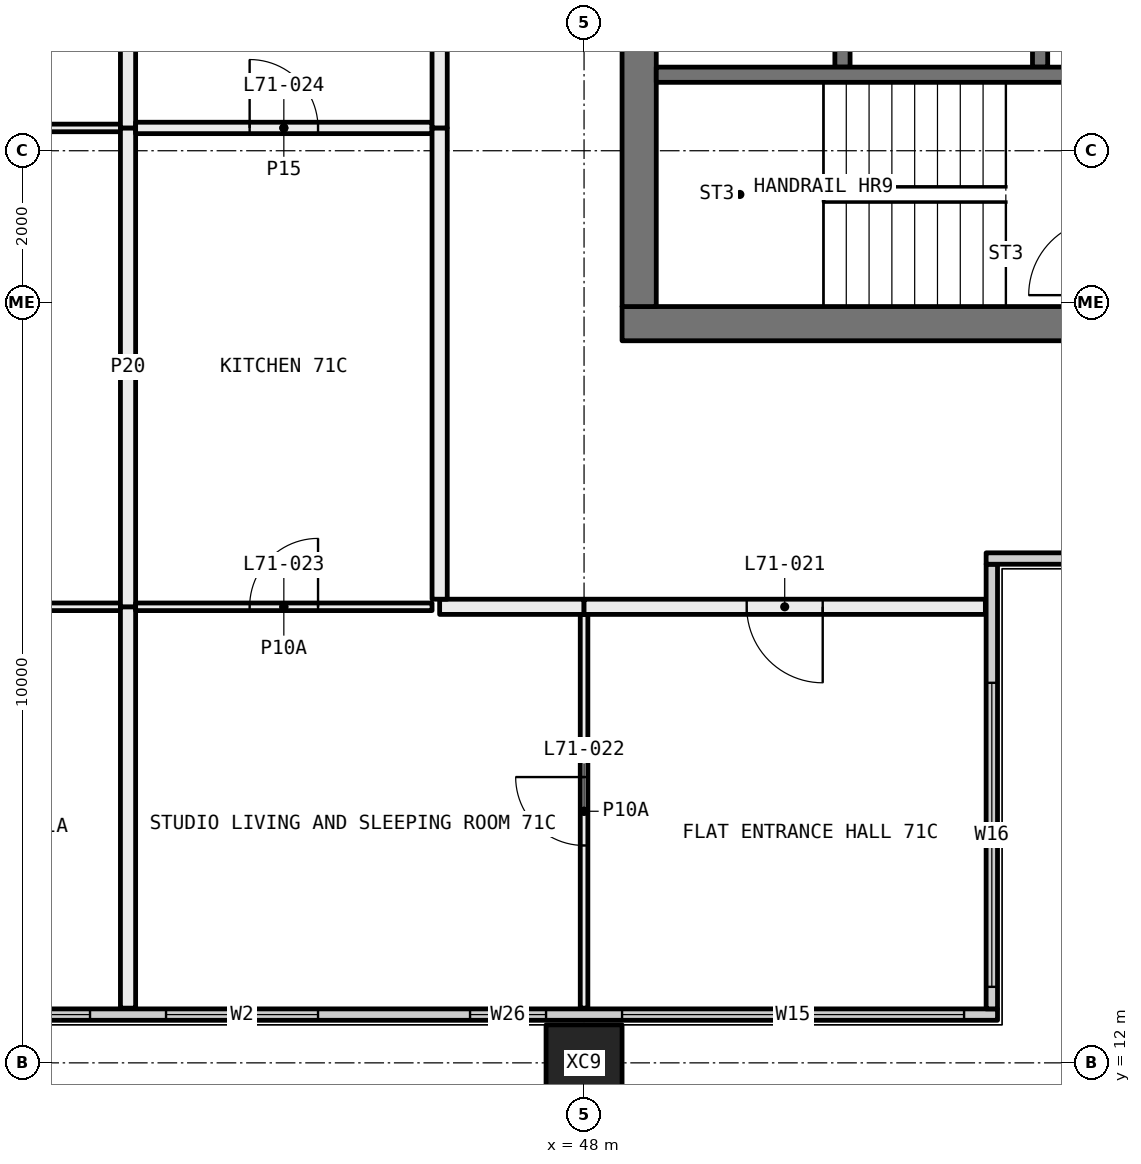
"""IFC4 building model, lengths in metres.
Left out: names, types, materials, properties, quantities, classifications, styles, units other than length and angle.
Written with IfcOpenShell. Run it as: python <this file> out.ifc"""

import sys

from ifc_helpers import new_model, si_unit, direction, frame, frame_2d, origin, origin_2d, place, context, subcontext, project, spatial, rectangle, hollow_rectangle, extrude, element, fill, save


model = new_model("IFC4")
c1 = context("Model", 3, precision=1e-05, world=origin(), true_north=direction((0.0, 1.0)))
c2 = subcontext(c1, "Body", "Model", "MODEL_VIEW")
j1 = project(units=[si_unit("LENGTHUNIT", "METRE"), si_unit("PLANEANGLEUNIT", "RADIAN")], contexts=[c1])
p1 = place(None, origin())
s1 = spatial("IfcSite", under=j1, at=p1, CompositionType="ELEMENT")
p2 = place(p1, origin())
s2 = spatial("IfcBuilding", under=s1, at=p2, CompositionType="ELEMENT")
p3 = place(p2, frame((0.0, 0.0, 262.8)))
s3 = spatial("IfcBuildingStorey", under=s2, at=p3, CompositionType="ELEMENT", Elevation=262.8)
p4 = place(p3, frame((48.0, 12.0, -0.4), z_axis=(0.0, 0.0, 1.0), x_axis=(1.0, 0.0, 0.0)))
e1 = element("IfcColumn", 1, at=p4, inside=s3, PredefinedType="COLUMN", context=c2, shape_type="SweptSolid", body=[
    extrude(hollow_rectangle(XDim=1.0, YDim=1.0, WallThickness=0.036, at=origin_2d()), origin(), (0.0, 0.0, 1.0), 3.45),
])
p5 = place(p3, frame((18.56, 12.635, 0.0), z_axis=(0.0, 0.0, 1.0), x_axis=(1.0, 0.0, 0.0)))
e2 = element("IfcWall", 2, at=p5, inside=s3, PredefinedType="ELEMENTEDWALL", context=c2, shape_type="SweptSolid", body=[
    extrude(rectangle(XDim=34.88, YDim=0.15, at=frame_2d((17.44, 0.0))), origin(), (0.0, 0.0, 1.0), 3.05),
])
p6 = place(p5, frame((0.44, 0.0, 0.45)))
e3 = element("IfcOpeningElement", 3, at=p6, cuts=e2, PredefinedType="OPENING", context=c2, shape_type="SweptSolid", body=[
    extrude(rectangle(XDim=4.5, YDim=2.55, at=frame_2d((2.25, 1.275))), frame((0.0, 0.085, 0.0), z_axis=(0.0, -1.0, 0.0), x_axis=(1.0, 0.0, 0.0)), (0.0, 0.0, 1.0), 0.17),
])
p7 = place(p5, frame((5.94, 0.0, 0.45)))
e4 = element("IfcOpeningElement", 4, at=p7, cuts=e2, PredefinedType="OPENING", context=c2, shape_type="SweptSolid", body=[
    extrude(rectangle(XDim=1.0, YDim=2.55, at=frame_2d((0.5, 1.275))), frame((0.0, 0.085, 0.0), z_axis=(0.0, -1.0, 0.0), x_axis=(1.0, 0.0, 0.0)), (0.0, 0.0, 1.0), 0.17),
])
p8 = place(p5, frame((8.94, 0.0, 0.45)))
e5 = element("IfcOpeningElement", 5, at=p8, cuts=e2, PredefinedType="OPENING", context=c2, shape_type="SweptSolid", body=[
    extrude(rectangle(XDim=2.0, YDim=2.55, at=frame_2d((1.0, 1.275))), frame((0.0, 0.085, 0.0), z_axis=(0.0, -1.0, 0.0), x_axis=(1.0, 0.0, 0.0)), (0.0, 0.0, 1.0), 0.17),
])
p9 = place(p5, frame((11.94, 0.0, 0.45)))
e6 = element("IfcOpeningElement", 6, at=p9, cuts=e2, PredefinedType="OPENING", context=c2, shape_type="SweptSolid", body=[
    extrude(rectangle(XDim=2.0, YDim=2.55, at=frame_2d((1.0, 1.275))), frame((0.0, 0.085, 0.0), z_axis=(0.0, -1.0, 0.0), x_axis=(1.0, 0.0, 0.0)), (0.0, 0.0, 1.0), 0.17),
])
p10 = place(p5, frame((15.94, 0.0, 0.45)))
e7 = element("IfcOpeningElement", 7, at=p10, cuts=e2, PredefinedType="OPENING", context=c2, shape_type="SweptSolid", body=[
    extrude(rectangle(XDim=1.0, YDim=2.55, at=frame_2d((0.5, 1.275))), frame((0.0, 0.085, 0.0), z_axis=(0.0, -1.0, 0.0), x_axis=(1.0, 0.0, 0.0)), (0.0, 0.0, 1.0), 0.17),
])
p11 = place(p5, frame((17.94, 0.0, 0.45)))
e8 = element("IfcOpeningElement", 8, at=p11, cuts=e2, PredefinedType="OPENING", context=c2, shape_type="SweptSolid", body=[
    extrude(rectangle(XDim=1.0, YDim=2.55, at=frame_2d((0.5, 1.275))), frame((0.0, 0.085, 0.0), z_axis=(0.0, -1.0, 0.0), x_axis=(1.0, 0.0, 0.0)), (0.0, 0.0, 1.0), 0.17),
])
p12 = place(p5, frame((20.94, 0.0, 0.45)))
e9 = element("IfcOpeningElement", 9, at=p12, cuts=e2, PredefinedType="OPENING", context=c2, shape_type="SweptSolid", body=[
    extrude(rectangle(XDim=2.0, YDim=2.55, at=frame_2d((1.0, 1.275))), frame((0.0, 0.085, 0.0), z_axis=(0.0, -1.0, 0.0), x_axis=(1.0, 0.0, 0.0)), (0.0, 0.0, 1.0), 0.17),
])
p13 = place(p5, frame((23.94, 0.0, 0.45)))
e10 = element("IfcOpeningElement", 10, at=p13, cuts=e2, PredefinedType="OPENING", context=c2, shape_type="SweptSolid", body=[
    extrude(rectangle(XDim=2.0, YDim=2.55, at=frame_2d((1.0, 1.275))), frame((0.0, 0.085, 0.0), z_axis=(0.0, -1.0, 0.0), x_axis=(1.0, 0.0, 0.0)), (0.0, 0.0, 1.0), 0.17),
])
p14 = place(p5, frame((27.94, 0.0, 0.45)))
e11 = element("IfcOpeningElement", 11, at=p14, cuts=e2, PredefinedType="OPENING", context=c2, shape_type="SweptSolid", body=[
    extrude(rectangle(XDim=1.0, YDim=2.55, at=frame_2d((0.5, 1.275))), frame((0.0, 0.085, 0.0), z_axis=(0.0, -1.0, 0.0), x_axis=(1.0, 0.0, 0.0)), (0.0, 0.0, 1.0), 0.17),
])
p15 = place(p5, frame((29.94, 0.0, 0.45)))
e12 = element("IfcOpeningElement", 12, at=p15, cuts=e2, PredefinedType="OPENING", context=c2, shape_type="SweptSolid", body=[
    extrude(rectangle(XDim=4.5, YDim=2.55, at=frame_2d((2.25, 1.275))), frame((0.0, 0.085, 0.0), z_axis=(0.0, -1.0, 0.0), x_axis=(1.0, 0.0, 0.0)), (0.0, 0.0, 1.0), 0.17),
])
p16 = place(p3, frame((53.365, 12.71, 0.0), z_axis=(0.0, 0.0, 1.0), x_axis=(0.0, 1.0, 0.0)))
e13 = element("IfcWall", 13, at=p16, inside=s3, PredefinedType="ELEMENTEDWALL", context=c2, shape_type="SweptSolid", body=[
    extrude(rectangle(XDim=5.85, YDim=0.15, at=frame_2d((2.925, 0.0))), origin(), (0.0, 0.0, 1.0), 3.05),
])
p17 = place(p16, frame((0.29, 0.0, 0.45)))
e14 = element("IfcOpeningElement", 14, at=p17, cuts=e13, PredefinedType="OPENING", context=c2, shape_type="SweptSolid", body=[
    extrude(rectangle(XDim=4.0, YDim=2.55, at=frame_2d((2.0, 1.275))), frame((0.0, 0.085, 0.0), z_axis=(0.0, -1.0, 0.0), x_axis=(1.0, 0.0, 0.0)), (0.0, 0.0, 1.0), 0.17),
])
p18 = place(p3, frame((53.29, 18.635, 0.0), z_axis=(0.0, 0.0, 1.0), x_axis=(1.0, 0.0, 0.0)))
e15 = element("IfcWall", 15, at=p18, inside=s3, PredefinedType="ELEMENTEDWALL", context=c2, shape_type="SweptSolid", body=[
    extrude(rectangle(XDim=6.15, YDim=0.15, at=frame_2d((3.075, 0.0))), origin(), (0.0, 0.0, 1.0), 3.05),
])
p19 = place(p18, frame((1.71, 0.0, 0.45)))
e16 = element("IfcOpeningElement", 16, at=p19, cuts=e15, PredefinedType="OPENING", context=c2, shape_type="SweptSolid", body=[
    extrude(rectangle(XDim=4.0, YDim=2.55, at=frame_2d((2.0, 1.275))), frame((0.0, 0.085, 0.0), z_axis=(0.0, -1.0, 0.0), x_axis=(1.0, 0.0, 0.0)), (0.0, 0.0, 1.0), 0.17),
])
p20 = place(p3, frame((41.9, 18.0, 0.0), z_axis=(0.0, 0.0, 1.0), x_axis=(-1.0, 0.0, 0.0)))
e17 = element("IfcWall", 17, at=p20, inside=s3, PredefinedType="PARTITIONING", context=c2, shape_type="SweptSolid", body=[
    extrude(rectangle(XDim=5.85, YDim=0.1, at=frame_2d((2.925, 0.0))), origin(), (0.0, 0.0, 1.0), 2.45),
])
p21 = place(p20, frame((2.475, 0.0, 0.0)))
e18 = element("IfcOpeningElement", 18, at=p21, cuts=e17, PredefinedType="OPENING", context=c2, shape_type="SweptSolid", body=[
    extrude(rectangle(XDim=0.9, YDim=2.1, at=frame_2d((0.45, 1.05))), frame((0.0, 0.06, 0.0), z_axis=(0.0, -1.0, 0.0), x_axis=(1.0, 0.0, 0.0)), (0.0, 0.0, 1.0), 0.12),
])
p22 = place(p3, frame((42.0, 12.72, 0.0), z_axis=(0.0, 0.0, 1.0), x_axis=(0.0, 1.0, 0.0)))
e19 = element("IfcWall", 19, at=p22, inside=s3, PredefinedType="PARTITIONING", context=c2, shape_type="SweptSolid", body=[
    extrude(rectangle(XDim=5.28, YDim=0.2, at=frame_2d((2.64, 0.0))), origin(), (0.0, 0.0, 1.0), 3.05),
])
p23 = place(p3, frame((41.9, 24.3, 0.0), z_axis=(0.0, 0.0, 1.0), x_axis=(-1.0, 0.0, 0.0)))
e20 = element("IfcWall", 20, at=p23, inside=s3, PredefinedType="PARTITIONING", context=c2, shape_type="SweptSolid", body=[
    extrude(rectangle(XDim=5.35, YDim=0.1, at=frame_2d((2.675, 0.0))), origin(), (0.0, 0.0, 1.0), 3.05),
])
p24 = place(p23, frame((2.225, 0.0, 0.0)))
e21 = element("IfcOpeningElement", 21, at=p24, cuts=e20, PredefinedType="OPENING", context=c2, shape_type="SweptSolid", body=[
    extrude(rectangle(XDim=0.9, YDim=2.1, at=frame_2d((0.45, 1.05))), frame((0.0, 0.06, 0.0), z_axis=(0.0, -1.0, 0.0), x_axis=(1.0, 0.0, 0.0)), (0.0, 0.0, 1.0), 0.12),
])
p25 = place(p3, frame((42.0, 18.0, 0.0), z_axis=(0.0, 0.0, 1.0), x_axis=(0.0, 1.0, 0.0)))
e22 = element("IfcWall", 22, at=p25, inside=s3, PredefinedType="PARTITIONING", context=c2, shape_type="SweptSolid", body=[
    extrude(rectangle(XDim=6.3, YDim=0.2, at=frame_2d((3.15, 0.0))), origin(), (0.0, 0.0, 1.0), 2.45),
])
p26 = place(p3, frame((42.0, 24.3, 0.0), z_axis=(0.0, 0.0, 1.0), x_axis=(0.0, 1.0, 0.0)))
e23 = element("IfcWall", 23, at=p26, inside=s3, PredefinedType="PARTITIONING", context=c2, shape_type="SweptSolid", body=[
    extrude(rectangle(XDim=4.5, YDim=0.2, at=frame_2d((2.25, 0.0))), origin(), (0.0, 0.0, 1.0), 3.05),
])
p27 = place(p3, frame((48.0, 12.72, 0.0), z_axis=(0.0, 0.0, 1.0), x_axis=(0.0, 1.0, 0.0)))
e24 = element("IfcWall", 24, at=p27, inside=s3, PredefinedType="PARTITIONING", context=c2, shape_type="SweptSolid", body=[
    extrude(rectangle(XDim=5.18, YDim=0.1, at=frame_2d((2.59, 0.0))), origin(), (0.0, 0.0, 1.0), 3.05),
])
p28 = place(p27, frame((2.14, 0.0, 0.0)))
e25 = element("IfcOpeningElement", 25, at=p28, cuts=e24, PredefinedType="OPENING", context=c2, shape_type="SweptSolid", body=[
    extrude(rectangle(XDim=0.9, YDim=2.1, at=frame_2d((0.45, 1.05))), frame((0.0, 0.06, 0.0), z_axis=(0.0, -1.0, 0.0), x_axis=(1.0, 0.0, 0.0)), (0.0, 0.0, 1.0), 0.12),
])
p29 = place(p3, frame((46.0, 18.0, 0.0), z_axis=(0.0, 0.0, 1.0), x_axis=(-1.0, 0.0, 0.0)))
e26 = element("IfcWall", 26, at=p29, inside=s3, PredefinedType="PARTITIONING", context=c2, shape_type="SweptSolid", body=[
    extrude(rectangle(XDim=3.9, YDim=0.1, at=frame_2d((1.95, 0.0))), origin(), (0.0, 0.0, 1.0), 3.05),
])
p30 = place(p29, frame((1.5, 0.0, 0.0)))
e27 = element("IfcOpeningElement", 27, at=p30, cuts=e26, PredefinedType="OPENING", context=c2, shape_type="SweptSolid", body=[
    extrude(rectangle(XDim=0.9, YDim=2.1, at=frame_2d((0.45, 1.05))), frame((0.0, 0.06, 0.0), z_axis=(0.0, -1.0, 0.0), x_axis=(1.0, 0.0, 0.0)), (0.0, 0.0, 1.0), 0.12),
])
p31 = place(p3, frame((48.0, 18.0, 0.0), z_axis=(0.0, 0.0, 1.0), x_axis=(-1.0, 0.0, 0.0)))
e28 = element("IfcWall", 28, at=p31, inside=s3, PredefinedType="PARTITIONING", context=c2, shape_type="SweptSolid", body=[
    extrude(rectangle(XDim=1.9, YDim=0.2, at=frame_2d((0.95, 0.0))), origin(), (0.0, 0.0, 1.0), 3.05),
])
p32 = place(p3, frame((53.28, 18.0, 0.0), z_axis=(0.0, 0.0, 1.0), x_axis=(-1.0, 0.0, 0.0)))
e29 = element("IfcWall", 29, at=p32, inside=s3, PredefinedType="PARTITIONING", context=c2, shape_type="SweptSolid", body=[
    extrude(rectangle(XDim=5.28, YDim=0.2, at=frame_2d((2.64, 0.0))), origin(), (0.0, 0.0, 1.0), 3.05),
])
p33 = place(p32, frame((2.14, 0.0, 0.0)))
e30 = element("IfcOpeningElement", 30, at=p33, cuts=e29, PredefinedType="OPENING", context=c2, shape_type="SweptSolid", body=[
    extrude(rectangle(XDim=1.0, YDim=2.1, at=frame_2d((0.5, 1.05))), frame((0.0, 0.11, 0.0), z_axis=(0.0, -1.0, 0.0), x_axis=(1.0, 0.0, 0.0)), (0.0, 0.0, 1.0), 0.22),
])
p34 = place(p3, frame((46.0, 24.3, 0.0), z_axis=(0.0, 0.0, 1.0), x_axis=(-1.0, 0.0, 0.0)))
e31 = element("IfcWall", 31, at=p34, inside=s3, PredefinedType="PARTITIONING", context=c2, shape_type="SweptSolid", body=[
    extrude(rectangle(XDim=3.9, YDim=0.15, at=frame_2d((1.95, 0.0))), origin(), (0.0, 0.0, 1.0), 3.05),
])
p35 = place(p34, frame((1.5, 0.0, 0.0)))
e32 = element("IfcOpeningElement", 32, at=p35, cuts=e31, PredefinedType="OPENING", context=c2, shape_type="SweptSolid", body=[
    extrude(rectangle(XDim=0.9, YDim=2.1, at=frame_2d((0.45, 1.05))), frame((0.0, 0.085, 0.0), z_axis=(0.0, -1.0, 0.0), x_axis=(1.0, 0.0, 0.0)), (0.0, 0.0, 1.0), 0.17),
])
p36 = place(p3, frame((46.1, 18.1, 0.0), z_axis=(0.0, 0.0, 1.0), x_axis=(0.0, 1.0, 0.0)))
e33 = element("IfcWall", 33, at=p36, inside=s3, PredefinedType="PARTITIONING", context=c2, shape_type="SweptSolid", body=[
    extrude(rectangle(XDim=6.2, YDim=0.2, at=frame_2d((3.1, 0.0))), origin(), (0.0, 0.0, 1.0), 2.45),
])
p37 = place(p3, frame((46.1, 24.3, 0.0), z_axis=(0.0, 0.0, 1.0), x_axis=(0.0, 1.0, 0.0)))
e34 = element("IfcWall", 34, at=p37, inside=s3, PredefinedType="PARTITIONING", context=c2, shape_type="SweptSolid", body=[
    extrude(rectangle(XDim=4.5, YDim=0.2, at=frame_2d((2.25, 0.0))), origin(), (0.0, 0.0, 1.0), 3.05),
])
p38 = place(p3, frame((59.5, 21.725, 0.0), z_axis=(0.0, 0.0, 1.0), x_axis=(-1.0, 0.0, 0.0)))
e35 = element("IfcWall", 35, at=p38, inside=s3, PredefinedType="SHEAR", context=c2, shape_type="SweptSolid", body=[
    extrude(rectangle(XDim=11.0, YDim=0.45, at=frame_2d((5.5, 0.0))), origin(), (0.0, 0.0, 1.0), 3.05),
])
p39 = place(p38, frame((1.125, 0.0, 0.0)))
e36 = element("IfcOpeningElement", 36, at=p39, cuts=e35, PredefinedType="OPENING", context=c2, shape_type="SweptSolid", body=[
    extrude(rectangle(XDim=1.0, YDim=2.1, at=frame_2d((0.5, 1.05))), frame((0.0, 0.235, 0.0), z_axis=(0.0, -1.0, 0.0), x_axis=(1.0, 0.0, 0.0)), (0.0, 0.0, 1.0), 0.47),
])
p40 = place(p3, frame((48.725, 21.95, 0.0), z_axis=(0.0, 0.0, 1.0), x_axis=(0.0, 1.0, 0.0)))
e37 = element("IfcWall", 37, at=p40, inside=s3, PredefinedType="SHEAR", context=c2, shape_type="SweptSolid", body=[
    extrude(rectangle(XDim=16.1, YDim=0.45, at=frame_2d((8.05, 0.0))), origin(), (0.0, 0.0, 1.0), 3.05),
])
p41 = place(p40, frame((7.25, 0.0, 0.0)))
e38 = element("IfcOpeningElement", 38, at=p41, cuts=e37, PredefinedType="OPENING", context=c2, shape_type="SweptSolid", body=[
    extrude(rectangle(XDim=1.6, YDim=2.1, at=frame_2d((0.8, 1.05))), frame((0.0, 0.235, 0.0), z_axis=(0.0, -1.0, 0.0), x_axis=(1.0, 0.0, 0.0)), (0.0, 0.0, 1.0), 0.47),
])
p42 = place(p3, frame((51.4, 25.1, 0.0), z_axis=(0.0, 0.0, 1.0), x_axis=(0.0, 1.0, 0.0)))
e39 = element("IfcWall", 39, at=p42, inside=s3, PredefinedType="SOLIDWALL", context=c2, shape_type="SweptSolid", body=[
    extrude(rectangle(XDim=12.95, YDim=0.2, at=frame_2d((6.475, 0.0))), origin(), (0.0, 0.0, 1.0), 3.05),
])
p43 = place(p42, frame((0.6, 0.0, 0.0)))
e40 = element("IfcOpeningElement", 40, at=p43, cuts=e39, PredefinedType="OPENING", context=c2, shape_type="SweptSolid", body=[
    extrude(rectangle(XDim=1.1, YDim=2.1, at=frame_2d((0.55, 1.05))), frame((0.0, 0.11, 0.0), z_axis=(0.0, -1.0, 0.0), x_axis=(1.0, 0.0, 0.0)), (0.0, 0.0, 1.0), 0.22),
])
p44 = place(p42, frame((3.1, 0.0, 0.0)))
e41 = element("IfcOpeningElement", 41, at=p44, cuts=e39, PredefinedType="OPENING", context=c2, shape_type="SweptSolid", body=[
    extrude(rectangle(XDim=1.1, YDim=2.1, at=frame_2d((0.55, 1.05))), frame((0.0, 0.11, 0.0), z_axis=(0.0, -1.0, 0.0), x_axis=(1.0, 0.0, 0.0)), (0.0, 0.0, 1.0), 0.22),
])
p45 = place(p42, frame((5.6, 0.0, 0.0)))
e42 = element("IfcOpeningElement", 42, at=p45, cuts=e39, PredefinedType="OPENING", context=c2, shape_type="SweptSolid", body=[
    extrude(rectangle(XDim=1.1, YDim=2.1, at=frame_2d((0.55, 1.05))), frame((0.0, 0.11, 0.0), z_axis=(0.0, -1.0, 0.0), x_axis=(1.0, 0.0, 0.0)), (0.0, 0.0, 1.0), 0.22),
])
p46 = place(p42, frame((8.1, 0.0, 0.0)))
e43 = element("IfcOpeningElement", 43, at=p46, cuts=e39, PredefinedType="OPENING", context=c2, shape_type="SweptSolid", body=[
    extrude(rectangle(XDim=1.1, YDim=2.1, at=frame_2d((0.55, 1.05))), frame((0.0, 0.11, 0.0), z_axis=(0.0, -1.0, 0.0), x_axis=(1.0, 0.0, 0.0)), (0.0, 0.0, 1.0), 0.22),
])
p47 = place(p42, frame((10.975, 0.0, 0.0)))
e44 = element("IfcOpeningElement", 44, at=p47, cuts=e39, PredefinedType="OPENING", context=c2, shape_type="SweptSolid", body=[
    extrude(rectangle(XDim=1.0, YDim=2.1, at=frame_2d((0.5, 1.05))), frame((0.0, 0.11, 0.0), z_axis=(0.0, -1.0, 0.0), x_axis=(1.0, 0.0, 0.0)), (0.0, 0.0, 1.0), 0.22),
])
p48 = place(p3, frame((54.0, 25.1, 0.0), z_axis=(0.0, 0.0, 1.0), x_axis=(0.0, 1.0, 0.0)))
e45 = element("IfcWall", 45, at=p48, inside=s3, PredefinedType="SOLIDWALL", context=c2, shape_type="SweptSolid", body=[
    extrude(rectangle(XDim=9.8, YDim=0.2, at=frame_2d((4.9, 0.0))), origin(), (0.0, 0.0, 1.0), 3.05),
])
p49 = place(p3, frame((56.5, 25.0, 0.0), z_axis=(0.0, 0.0, 1.0), x_axis=(-1.0, 0.0, 0.0)))
e46 = element("IfcWall", 46, at=p49, inside=s3, PredefinedType="SOLIDWALL", context=c2, shape_type="SweptSolid", body=[
    extrude(rectangle(XDim=7.55, YDim=0.2, at=frame_2d((3.775, 0.0))), origin(), (0.0, 0.0, 1.0), 3.05),
])
p50 = place(p12, origin())
e47 = element("IfcWindow", 47, at=p50, inside=s3, PartitioningType="SINGLE_PANEL", PredefinedType="WINDOW", context=c2, shape_type="SweptSolid", body=[
    extrude(rectangle(XDim=2.0, YDim=2.55, at=frame_2d((1.0, 1.275))), frame((0.0, 0.03, 0.0), z_axis=(0.0, -1.0, 0.0), x_axis=(1.0, 0.0, 0.0)), (0.0, 0.0, 1.0), 0.06),
])
fill(e9, e47)
p51 = place(p13, origin())
e48 = element("IfcWindow", 48, at=p51, inside=s3, PartitioningType="SINGLE_PANEL", PredefinedType="WINDOW", context=c2, shape_type="SweptSolid", body=[
    extrude(rectangle(XDim=2.0, YDim=2.55, at=frame_2d((1.0, 1.275))), frame((0.0, 0.03, 0.0), z_axis=(0.0, -1.0, 0.0), x_axis=(1.0, 0.0, 0.0)), (0.0, 0.0, 1.0), 0.06),
])
fill(e10, e48)
p52 = place(p14, origin())
e49 = element("IfcWindow", 49, at=p52, inside=s3, PartitioningType="SINGLE_PANEL", PredefinedType="WINDOW", context=c2, shape_type="SweptSolid", body=[
    extrude(rectangle(XDim=1.0, YDim=2.55, at=frame_2d((0.5, 1.275))), frame((0.0, 0.03, 0.0), z_axis=(0.0, -1.0, 0.0), x_axis=(1.0, 0.0, 0.0)), (0.0, 0.0, 1.0), 0.06),
])
fill(e11, e49)
p53 = place(p15, origin())
e50 = element("IfcWindow", 50, at=p53, inside=s3, PartitioningType="SINGLE_PANEL", PredefinedType="WINDOW", context=c2, shape_type="SweptSolid", body=[
    extrude(rectangle(XDim=4.5, YDim=2.55, at=frame_2d((2.25, 1.275))), frame((0.0, 0.03, 0.0), z_axis=(0.0, -1.0, 0.0), x_axis=(1.0, 0.0, 0.0)), (0.0, 0.0, 1.0), 0.06),
])
fill(e12, e50)
p54 = place(p17, origin())
e51 = element("IfcWindow", 51, at=p54, inside=s3, PartitioningType="SINGLE_PANEL", PredefinedType="WINDOW", context=c2, shape_type="SweptSolid", body=[
    extrude(rectangle(XDim=4.0, YDim=2.55, at=frame_2d((2.0, 1.275))), frame((0.0, 0.03, 0.0), z_axis=(0.0, -1.0, 0.0), x_axis=(1.0, 0.0, 0.0)), (0.0, 0.0, 1.0), 0.06),
])
fill(e14, e51)
p55 = place(p33, origin())
e52 = element("IfcDoor", 52, at=p55, inside=s3, OperationType="SINGLE_SWING_RIGHT", PredefinedType="DOOR", context=c2, shape_type="SweptSolid", body=[
    extrude(rectangle(XDim=1.0, YDim=2.1, at=frame_2d((0.5, 1.05))), frame((0.0, 0.025, 0.0), z_axis=(0.0, -1.0, 0.0), x_axis=(1.0, 0.0, 0.0)), (0.0, 0.0, 1.0), 0.05),
])
fill(e30, e52)
p56 = place(p28, origin())
e53 = element("IfcDoor", 53, at=p56, inside=s3, OperationType="SINGLE_SWING_LEFT", PredefinedType="DOOR", context=c2, shape_type="SweptSolid", body=[
    extrude(rectangle(XDim=0.9, YDim=2.1, at=frame_2d((0.45, 1.05))), frame((0.0, 0.025, 0.0), z_axis=(0.0, -1.0, 0.0), x_axis=(1.0, 0.0, 0.0)), (0.0, 0.0, 1.0), 0.05),
])
fill(e25, e53)
p57 = place(p30, frame((0.9, 0.0, 0.0), x_axis=(-1.0, 0.0, 0.0)))
e54 = element("IfcDoor", 54, at=p57, inside=s3, OperationType="SINGLE_SWING_LEFT", PredefinedType="DOOR", context=c2, shape_type="SweptSolid", body=[
    extrude(rectangle(XDim=0.9, YDim=2.1, at=frame_2d((0.45, 1.05))), frame((0.0, 0.025, 0.0), z_axis=(0.0, -1.0, 0.0), x_axis=(1.0, 0.0, 0.0)), (0.0, 0.0, 1.0), 0.05),
])
fill(e27, e54)
p58 = place(p35, frame((0.9, 0.0, 0.0), x_axis=(-1.0, 0.0, 0.0)))
e55 = element("IfcDoor", 55, at=p58, inside=s3, OperationType="SINGLE_SWING_RIGHT", PredefinedType="DOOR", context=c2, shape_type="SweptSolid", body=[
    extrude(rectangle(XDim=0.9, YDim=2.1, at=frame_2d((0.45, 1.05))), frame((0.0, 0.025, 0.0), z_axis=(0.0, -1.0, 0.0), x_axis=(1.0, 0.0, 0.0)), (0.0, 0.0, 1.0), 0.05),
])
fill(e32, e55)
save(model, sys.argv[1])
